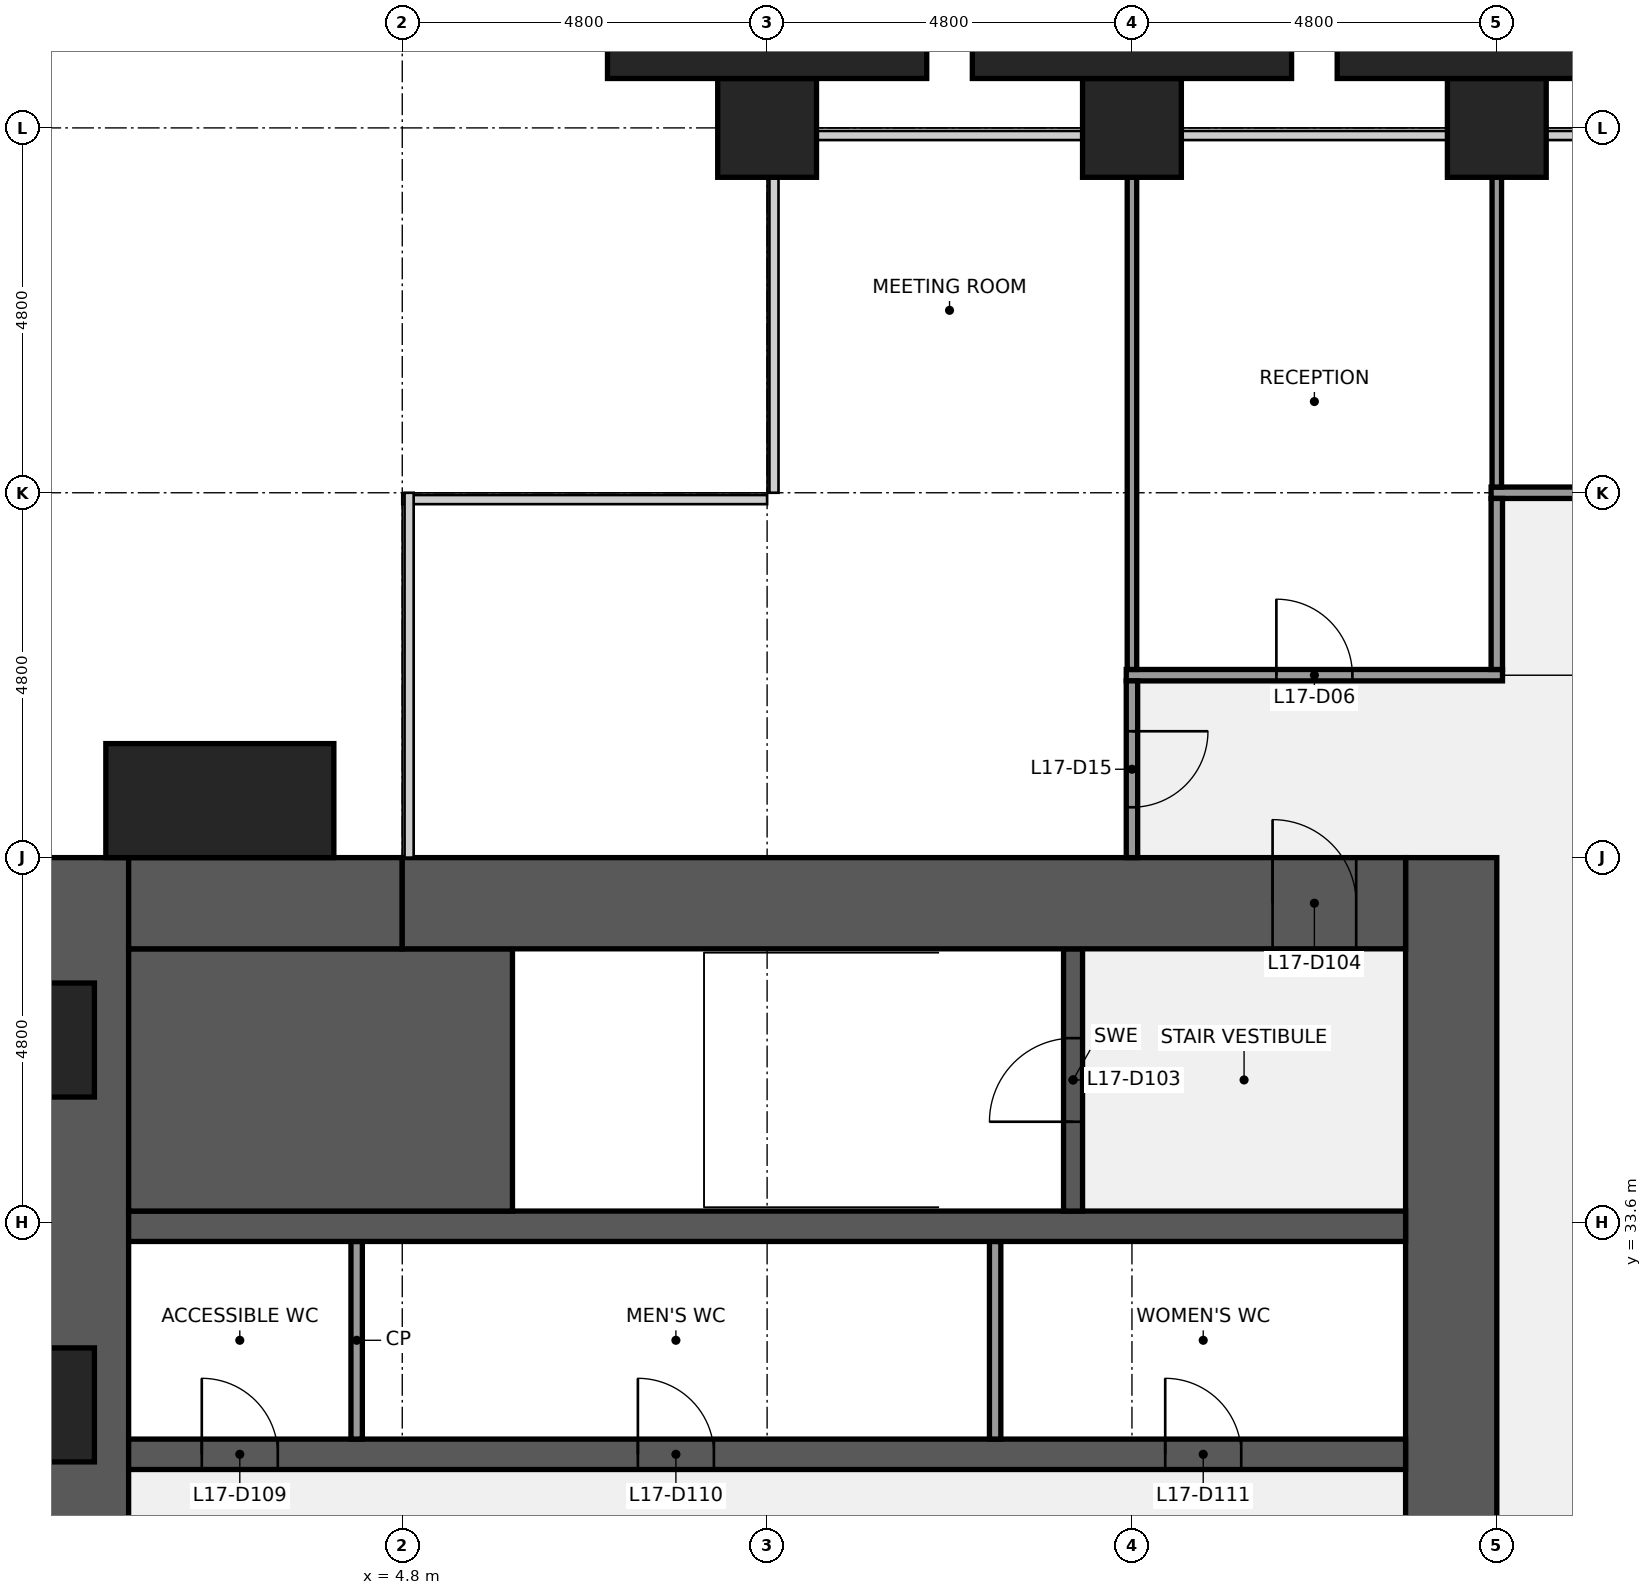
"""IFC4 building model, lengths in metres.
Left out: names, types, materials, properties, quantities, classifications, styles, units other than length and angle.
Written with IfcOpenShell. Run it as: python <this file> out.ifc"""

import sys

from ifc_helpers import new_model, si_unit, direction, frame, frame_2d, origin, origin_2d, place, context, subcontext, project, spatial, rectangle, extrude, element, fill, save


model = new_model("IFC4")
c1 = context("Model", 3, precision=1e-05, world=origin(), true_north=direction((0.0, 1.0)))
c2 = subcontext(c1, "Body", "Model", "MODEL_VIEW")
j1 = project(units=[si_unit("LENGTHUNIT", "METRE"), si_unit("PLANEANGLEUNIT", "RADIAN")], contexts=[c1])
p1 = place(None, origin())
s1 = spatial("IfcSite", under=j1, at=p1, CompositionType="ELEMENT")
p2 = place(p1, origin())
s2 = spatial("IfcBuilding", under=s1, at=p2, CompositionType="ELEMENT")
p3 = place(p2, frame((0.0, 0.0, 79.0)))
s3 = spatial("IfcBuildingStorey", under=s2, at=p3, CompositionType="ELEMENT", Elevation=79.0)
for number, where, z_axis, x_axis in (
    (1, (9.6, 48.0, 0.0), (0.0, 0.0, 1.0), (1.0, 0.0, 0.0)),
    (2, (14.4, 48.0, 0.0), (0.0, 0.0, 1.0), (1.0, 0.0, 0.0)),
    (3, (19.2, 48.0, 0.0), (0.0, 0.0, 1.0), (1.0, 0.0, 0.0)),
):
    element("IfcColumn", number, at=place(p3, frame(where, z_axis=z_axis, x_axis=x_axis)), inside=s3, PredefinedType="COLUMN", context=c2, shape_type="SweptSolid", body=[
        extrude(rectangle(XDim=1.3, YDim=1.3, at=origin_2d()), origin(), (0.0, 0.0, 1.0), 4.0),
    ])
p4 = place(p3, frame((0.6, 9.6, 0.0), z_axis=(0.0, 0.0, 1.0), x_axis=(0.0, 1.0, 0.0)))
e4 = element("IfcWall", 4, at=p4, inside=s3, PredefinedType="SHEAR", context=c2, shape_type="SweptSolid", body=[
    extrude(rectangle(XDim=28.8, YDim=1.2, at=frame_2d((14.4, 0.0))), origin(), (0.0, 0.0, 1.0), 3.84),
])
p5 = place(p4, frame((8.85, 0.0, 0.9)))
e5 = element("IfcOpeningElement", 5, at=p5, cuts=e4, PredefinedType="OPENING", context=c2, shape_type="SweptSolid", body=[
    extrude(rectangle(XDim=1.5, YDim=1.5, at=frame_2d((0.75, 0.75))), frame((0.0, 0.61, 0.0), z_axis=(0.0, -1.0, 0.0), x_axis=(1.0, 0.0, 0.0)), (0.0, 0.0, 1.0), 1.22),
])
p6 = place(p4, frame((18.45, 0.0, 0.9)))
e6 = element("IfcOpeningElement", 6, at=p6, cuts=e4, PredefinedType="OPENING", context=c2, shape_type="SweptSolid", body=[
    extrude(rectangle(XDim=1.5, YDim=1.5, at=frame_2d((0.75, 0.75))), frame((0.0, 0.61, 0.0), z_axis=(0.0, -1.0, 0.0), x_axis=(1.0, 0.0, 0.0)), (0.0, 0.0, 1.0), 1.22),
])
p7 = place(p3, frame((18.6, 38.4, 0.0), z_axis=(0.0, 0.0, 1.0), x_axis=(0.0, -1.0, 0.0)))
e7 = element("IfcWall", 7, at=p7, inside=s3, PredefinedType="SHEAR", context=c2, shape_type="SweptSolid", body=[
    extrude(rectangle(XDim=28.8, YDim=1.2, at=frame_2d((14.4, 0.0))), origin(), (0.0, 0.0, 1.0), 3.84),
])
p8 = place(p7, frame((18.3, 0.0, 0.0)))
e8 = element("IfcOpeningElement", 8, at=p8, cuts=e7, PredefinedType="OPENING", context=c2, shape_type="SweptSolid", body=[
    extrude(rectangle(XDim=1.8, YDim=2.1, at=frame_2d((0.9, 1.05))), frame((0.0, 0.61, 0.0), z_axis=(0.0, -1.0, 0.0), x_axis=(1.0, 0.0, 0.0)), (0.0, 0.0, 1.0), 1.22),
])
p9 = place(p7, frame((8.7, 0.0, 0.0)))
e9 = element("IfcOpeningElement", 9, at=p9, cuts=e7, PredefinedType="OPENING", context=c2, shape_type="SweptSolid", body=[
    extrude(rectangle(XDim=1.8, YDim=2.1, at=frame_2d((0.9, 1.05))), frame((0.0, 0.61, 0.0), z_axis=(0.0, -1.0, 0.0), x_axis=(1.0, 0.0, 0.0)), (0.0, 0.0, 1.0), 1.22),
])
p10 = place(p3, frame((1.2, 30.55, 0.0), z_axis=(0.0, 0.0, 1.0), x_axis=(1.0, 0.0, 0.0)))
e10 = element("IfcWall", 10, at=p10, inside=s3, PredefinedType="SHEAR", context=c2, shape_type="SweptSolid", body=[
    extrude(rectangle(XDim=16.8, YDim=0.4, at=frame_2d((8.4, 0.0))), origin(), (0.0, 0.0, 1.0), 3.84),
])
p11 = place(p10, frame((0.962, 0.0, 0.0)))
e11 = element("IfcOpeningElement", 11, at=p11, cuts=e10, PredefinedType="OPENING", context=c2, shape_type="SweptSolid", body=[
    extrude(rectangle(XDim=1.0, YDim=2.1, at=frame_2d((0.5, 1.05))), frame((0.0, 0.21, 0.0), z_axis=(0.0, -1.0, 0.0), x_axis=(1.0, 0.0, 0.0)), (0.0, 0.0, 1.0), 0.42),
])
p12 = place(p10, frame((6.7, 0.0, 0.0)))
e12 = element("IfcOpeningElement", 12, at=p12, cuts=e10, PredefinedType="OPENING", context=c2, shape_type="SweptSolid", body=[
    extrude(rectangle(XDim=1.0, YDim=2.1, at=frame_2d((0.5, 1.05))), frame((0.0, 0.21, 0.0), z_axis=(0.0, -1.0, 0.0), x_axis=(1.0, 0.0, 0.0)), (0.0, 0.0, 1.0), 0.42),
])
p13 = place(p10, frame((13.637, 0.0, 0.0)))
e13 = element("IfcOpeningElement", 13, at=p13, cuts=e10, PredefinedType="OPENING", context=c2, shape_type="SweptSolid", body=[
    extrude(rectangle(XDim=1.0, YDim=2.1, at=frame_2d((0.5, 1.05))), frame((0.0, 0.21, 0.0), z_axis=(0.0, -1.0, 0.0), x_axis=(1.0, 0.0, 0.0)), (0.0, 0.0, 1.0), 0.42),
])
for number, where, z_axis, x_axis in (
    (14, (4.2, 30.75, 0.0), (0.0, 0.0, 1.0), (0.0, 1.0, 0.0)),
    (15, (12.6, 30.75, 0.0), (0.0, 0.0, 1.0), (0.0, 1.0, 0.0)),
):
    element("IfcWall", number, at=place(p3, frame(where, z_axis=z_axis, x_axis=x_axis)), inside=s3, PredefinedType="PARTITIONING", context=c2, shape_type="SweptSolid", body=[
        extrude(rectangle(XDim=2.6, YDim=0.15, at=frame_2d((1.3, 0.0))), origin(), (0.0, 0.0, 1.0), 3.84),
    ])
p14 = place(p3, frame((1.2, 33.55, 0.0), z_axis=(0.0, 0.0, 1.0), x_axis=(1.0, 0.0, 0.0)))
e16 = element("IfcWall", 16, at=p14, inside=s3, PredefinedType="SHEAR", context=c2, shape_type="SweptSolid", body=[
    extrude(rectangle(XDim=16.8, YDim=0.4, at=frame_2d((8.4, 0.0))), origin(), (0.0, 0.0, 1.0), 3.84),
])
p15 = place(p3, frame((1.2, 35.475, 0.0), z_axis=(0.0, 0.0, 1.0), x_axis=(1.0, 0.0, 0.0)))
e17 = element("IfcWall", 17, at=p15, inside=s3, PredefinedType="SHEAR", context=c2, shape_type="SweptSolid", body=[
    extrude(rectangle(XDim=5.05, YDim=3.45, at=frame_2d((2.525, 0.0))), origin(), (0.0, 0.0, 1.0), 3.84),
])
p16 = place(p3, frame((13.625, 33.75, 0.0), z_axis=(0.0, 0.0, 1.0), x_axis=(0.0, 1.0, 0.0)))
e18 = element("IfcWall", 18, at=p16, inside=s3, PredefinedType="SHEAR", context=c2, shape_type="SweptSolid", body=[
    extrude(rectangle(XDim=3.45, YDim=0.25, at=frame_2d((1.725, 0.0))), origin(), (0.0, 0.0, 1.0), 3.84),
])
p17 = place(p16, frame((1.175, 0.0, 0.0)))
e19 = element("IfcOpeningElement", 19, at=p17, cuts=e18, PredefinedType="OPENING", context=c2, shape_type="SweptSolid", body=[
    extrude(rectangle(XDim=1.1, YDim=2.1, at=frame_2d((0.55, 1.05))), frame((0.0, 0.135, 0.0), z_axis=(0.0, -1.0, 0.0), x_axis=(1.0, 0.0, 0.0)), (0.0, 0.0, 1.0), 0.27),
])
p18 = place(p3, frame((1.2, 37.8, 0.0), z_axis=(0.0, 0.0, 1.0), x_axis=(1.0, 0.0, 0.0)))
e20 = element("IfcWall", 20, at=p18, inside=s3, PredefinedType="SHEAR", context=c2, shape_type="SweptSolid", body=[
    extrude(rectangle(XDim=3.6, YDim=1.2, at=frame_2d((1.8, 0.0))), origin(), (0.0, 0.0, 1.0), 3.84),
])
p19 = place(p3, frame((4.8, 37.8, 0.0), z_axis=(0.0, 0.0, 1.0), x_axis=(1.0, 0.0, 0.0)))
e21 = element("IfcWall", 21, at=p19, inside=s3, PredefinedType="SHEAR", context=c2, shape_type="SweptSolid", body=[
    extrude(rectangle(XDim=13.2, YDim=1.2, at=frame_2d((6.6, 0.0))), origin(), (0.0, 0.0, 1.0), 3.84),
])
p20 = place(p19, frame((11.45, 0.0, 0.0)))
e22 = element("IfcOpeningElement", 22, at=p20, cuts=e21, PredefinedType="OPENING", context=c2, shape_type="SweptSolid", body=[
    extrude(rectangle(XDim=1.1, YDim=2.1, at=frame_2d((0.55, 1.05))), frame((0.0, 0.61, 0.0), z_axis=(0.0, -1.0, 0.0), x_axis=(1.0, 0.0, 0.0)), (0.0, 0.0, 1.0), 1.22),
])
p21 = place(p3, frame((14.325, 40.8, 0.0), z_axis=(0.0, 0.0, 1.0), x_axis=(1.0, 0.0, 0.0)))
e23 = element("IfcWall", 23, at=p21, inside=s3, PredefinedType="PARTITIONING", context=c2, shape_type="SweptSolid", body=[
    extrude(rectangle(XDim=4.95, YDim=0.15, at=frame_2d((2.475, 0.0))), origin(), (0.0, 0.0, 1.0), 2.849),
])
p22 = place(p21, frame((1.975, 0.0, 0.0)))
e24 = element("IfcOpeningElement", 24, at=p22, cuts=e23, PredefinedType="OPENING", context=c2, shape_type="SweptSolid", body=[
    extrude(rectangle(XDim=1.0, YDim=2.1, at=frame_2d((0.5, 1.05))), frame((0.0, 0.085, 0.0), z_axis=(0.0, -1.0, 0.0), x_axis=(1.0, 0.0, 0.0)), (0.0, 0.0, 1.0), 0.17),
])
p23 = place(p3, frame((19.125, 43.2, 0.0), z_axis=(0.0, 0.0, 1.0), x_axis=(1.0, 0.0, 0.0)))
e25 = element("IfcWall", 25, at=p23, inside=s3, PredefinedType="PARTITIONING", context=c2, shape_type="SweptSolid", body=[
    extrude(rectangle(XDim=19.35, YDim=0.15, at=frame_2d((9.675, 0.0))), origin(), (0.0, 0.0, 1.0), 2.849),
])
p24 = place(p23, frame((9.175, 0.0, 0.0)))
e26 = element("IfcOpeningElement", 26, at=p24, cuts=e25, PredefinedType="OPENING", context=c2, shape_type="SweptSolid", body=[
    extrude(rectangle(XDim=1.0, YDim=2.1, at=frame_2d((0.5, 1.05))), frame((0.0, 0.085, 0.0), z_axis=(0.0, -1.0, 0.0), x_axis=(1.0, 0.0, 0.0)), (0.0, 0.0, 1.0), 0.17),
])
p25 = place(p3, frame((14.4, 40.875, 0.0), z_axis=(0.0, 0.0, 1.0), x_axis=(0.0, 1.0, 0.0)))
e27 = element("IfcWall", 27, at=p25, inside=s3, PredefinedType="PARTITIONING", context=c2, shape_type="SweptSolid", body=[
    extrude(rectangle(XDim=6.475, YDim=0.125, at=frame_2d((3.238, 0.0))), origin(), (0.0, 0.0, 1.0), 2.849),
])
p26 = place(p3, frame((14.4, 38.4, 0.0), z_axis=(0.0, 0.0, 1.0), x_axis=(0.0, 1.0, 0.0)))
e28 = element("IfcWall", 28, at=p26, inside=s3, PredefinedType="PARTITIONING", context=c2, shape_type="SweptSolid", body=[
    extrude(rectangle(XDim=2.325, YDim=0.15, at=frame_2d((1.163, 0.0))), origin(), (0.0, 0.0, 1.0), 2.849),
])
p27 = place(p26, frame((0.663, 0.0, 0.0)))
e29 = element("IfcOpeningElement", 29, at=p27, cuts=e28, PredefinedType="OPENING", context=c2, shape_type="SweptSolid", body=[
    extrude(rectangle(XDim=1.0, YDim=2.1, at=frame_2d((0.5, 1.05))), frame((0.0, 0.085, 0.0), z_axis=(0.0, -1.0, 0.0), x_axis=(1.0, 0.0, 0.0)), (0.0, 0.0, 1.0), 0.17),
])
p28 = place(p3, frame((19.2, 43.275, 0.0), z_axis=(0.0, 0.0, 1.0), x_axis=(0.0, 1.0, 0.0)))
e30 = element("IfcWall", 30, at=p28, inside=s3, PredefinedType="PARTITIONING", context=c2, shape_type="SweptSolid", body=[
    extrude(rectangle(XDim=4.075, YDim=0.125, at=frame_2d((2.038, 0.0))), origin(), (0.0, 0.0, 1.0), 2.849),
])
p29 = place(p3, frame((19.2, 40.875, 0.0), z_axis=(0.0, 0.0, 1.0), x_axis=(0.0, 1.0, 0.0)))
e31 = element("IfcWall", 31, at=p29, inside=s3, PredefinedType="PARTITIONING", context=c2, shape_type="SweptSolid", body=[
    extrude(rectangle(XDim=2.25, YDim=0.15, at=frame_2d((1.125, 0.0))), origin(), (0.0, 0.0, 1.0), 2.849),
])
p30 = place(p3, frame((2.4, 39.15, 0.0), z_axis=(0.0, 0.0, 1.0), x_axis=(1.0, 0.0, 0.0)))
e32 = element("IfcColumn", 32, at=p30, inside=s3, PredefinedType="PILASTER", context=c2, shape_type="SweptSolid", body=[
    extrude(rectangle(XDim=3.0, YDim=1.5, at=origin_2d()), origin(), (0.0, 0.0, 1.0), 4.0),
])
for number, where, z_axis, x_axis in (
    (33, (9.6, 49.075, 0.0), (0.0, 0.0, 1.0), (1.0, 0.0, 0.0)),
    (34, (14.4, 49.075, 0.0), (0.0, 0.0, 1.0), (1.0, 0.0, 0.0)),
    (35, (19.2, 49.075, 0.0), (0.0, 0.0, 1.0), (1.0, 0.0, 0.0)),
):
    element("IfcColumn", number, at=place(p3, frame(where, z_axis=z_axis, x_axis=x_axis)), inside=s3, PredefinedType="PILASTER", context=c2, shape_type="SweptSolid", body=[
        extrude(rectangle(XDim=4.2, YDim=0.85, at=origin_2d()), origin(), (0.0, 0.0, 1.0), 4.0),
    ])
p31 = place(p17, origin())
e36 = element("IfcDoor", 36, at=p31, inside=s3, OperationType="SINGLE_SWING_LEFT", PredefinedType="DOOR", context=c2, shape_type="SweptSolid", body=[
    extrude(rectangle(XDim=1.1, YDim=2.1, at=frame_2d((0.55, 1.05))), frame((0.0, 0.025, 0.0), z_axis=(0.0, -1.0, 0.0), x_axis=(1.0, 0.0, 0.0)), (0.0, 0.0, 1.0), 0.05),
])
fill(e19, e36)
p32 = place(p20, origin())
e37 = element("IfcDoor", 37, at=p32, inside=s3, OperationType="SINGLE_SWING_LEFT", PredefinedType="DOOR", context=c2, shape_type="SweptSolid", body=[
    extrude(rectangle(XDim=1.1, YDim=2.1, at=frame_2d((0.55, 1.05))), frame((0.0, 0.025, 0.0), z_axis=(0.0, -1.0, 0.0), x_axis=(1.0, 0.0, 0.0)), (0.0, 0.0, 1.0), 0.05),
])
fill(e22, e37)
p33 = place(p11, origin())
e38 = element("IfcDoor", 38, at=p33, inside=s3, OperationType="SINGLE_SWING_LEFT", PredefinedType="DOOR", context=c2, shape_type="SweptSolid", body=[
    extrude(rectangle(XDim=1.0, YDim=2.1, at=frame_2d((0.5, 1.05))), frame((0.0, 0.025, 0.0), z_axis=(0.0, -1.0, 0.0), x_axis=(1.0, 0.0, 0.0)), (0.0, 0.0, 1.0), 0.05),
])
fill(e11, e38)
p34 = place(p12, origin())
e39 = element("IfcDoor", 39, at=p34, inside=s3, OperationType="SINGLE_SWING_LEFT", PredefinedType="DOOR", context=c2, shape_type="SweptSolid", body=[
    extrude(rectangle(XDim=1.0, YDim=2.1, at=frame_2d((0.5, 1.05))), frame((0.0, 0.025, 0.0), z_axis=(0.0, -1.0, 0.0), x_axis=(1.0, 0.0, 0.0)), (0.0, 0.0, 1.0), 0.05),
])
fill(e12, e39)
p35 = place(p13, origin())
e40 = element("IfcDoor", 40, at=p35, inside=s3, OperationType="SINGLE_SWING_LEFT", PredefinedType="DOOR", context=c2, shape_type="SweptSolid", body=[
    extrude(rectangle(XDim=1.0, YDim=2.1, at=frame_2d((0.5, 1.05))), frame((0.0, 0.025, 0.0), z_axis=(0.0, -1.0, 0.0), x_axis=(1.0, 0.0, 0.0)), (0.0, 0.0, 1.0), 0.05),
])
fill(e13, e40)
p36 = place(p22, origin())
e41 = element("IfcDoor", 41, at=p36, inside=s3, OperationType="SINGLE_SWING_LEFT", PredefinedType="DOOR", context=c2, shape_type="SweptSolid", body=[
    extrude(rectangle(XDim=1.0, YDim=2.1, at=frame_2d((0.5, 1.05))), frame((0.0, 0.025, 0.0), z_axis=(0.0, -1.0, 0.0), x_axis=(1.0, 0.0, 0.0)), (0.0, 0.0, 1.0), 0.05),
])
fill(e24, e41)
p37 = place(p27, origin())
e42 = element("IfcDoor", 42, at=p37, inside=s3, OperationType="SINGLE_SWING_RIGHT", PredefinedType="DOOR", context=c2, shape_type="SweptSolid", body=[
    extrude(rectangle(XDim=1.0, YDim=2.1, at=frame_2d((0.5, 1.05))), frame((0.0, 0.025, 0.0), z_axis=(0.0, -1.0, 0.0), x_axis=(1.0, 0.0, 0.0)), (0.0, 0.0, 1.0), 0.05),
])
fill(e29, e42)
save(model, sys.argv[1])
